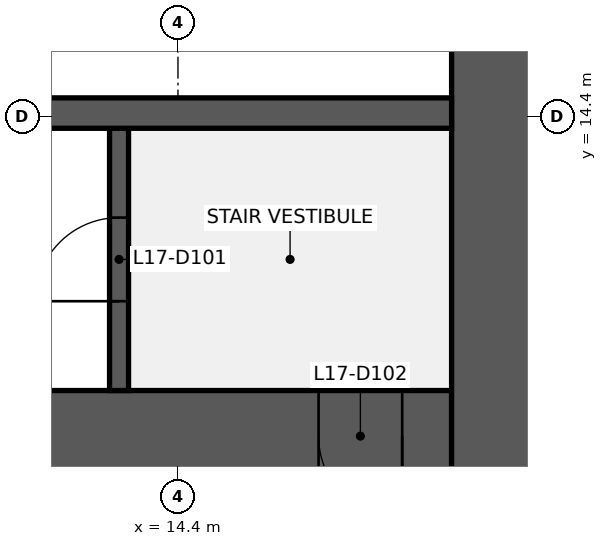
"""IFC4 building model, lengths in metres.
Left out: names, types, materials, properties, quantities, classifications, styles, units other than length and angle.
Written with IfcOpenShell. Run it as: python <this file> out.ifc"""

import sys

from ifc_helpers import new_model, si_unit, direction, frame, frame_2d, origin, place, context, subcontext, project, spatial, rectangle, extrude, element, fill, save


model = new_model("IFC4")
c1 = context("Model", 3, precision=1e-05, world=origin(), true_north=direction((0.0, 1.0)))
c2 = subcontext(c1, "Body", "Model", "MODEL_VIEW")
j1 = project(units=[si_unit("LENGTHUNIT", "METRE"), si_unit("PLANEANGLEUNIT", "RADIAN")], contexts=[c1])
p1 = place(None, origin())
s1 = spatial("IfcSite", under=j1, at=p1, CompositionType="ELEMENT")
p2 = place(p1, origin())
s2 = spatial("IfcBuilding", under=s1, at=p2, CompositionType="ELEMENT")
p3 = place(p2, frame((0.0, 0.0, 79.0)))
s3 = spatial("IfcBuildingStorey", under=s2, at=p3, CompositionType="ELEMENT", Elevation=79.0)
p4 = place(p3, frame((18.0, 10.2, 0.0), z_axis=(0.0, 0.0, 1.0), x_axis=(-1.0, 0.0, 0.0)))
e1 = element("IfcWall", 1, at=p4, inside=s3, PredefinedType="SHEAR", context=c2, shape_type="SweptSolid", body=[
    extrude(rectangle(XDim=13.2, YDim=1.2, at=frame_2d((6.6, 0.0))), origin(), (0.0, 0.0, 1.0), 3.84),
])
p5 = place(p4, frame((0.65, 0.0, 0.0)))
e2 = element("IfcOpeningElement", 2, at=p5, cuts=e1, PredefinedType="OPENING", context=c2, shape_type="SweptSolid", body=[
    extrude(rectangle(XDim=1.1, YDim=2.1, at=frame_2d((0.55, 1.05))), frame((0.0, 0.61, 0.0), z_axis=(0.0, -1.0, 0.0), x_axis=(1.0, 0.0, 0.0)), (0.0, 0.0, 1.0), 1.22),
])
p6 = place(p3, frame((18.6, 38.4, 0.0), z_axis=(0.0, 0.0, 1.0), x_axis=(0.0, -1.0, 0.0)))
e3 = element("IfcWall", 3, at=p6, inside=s3, PredefinedType="SHEAR", context=c2, shape_type="SweptSolid", body=[
    extrude(rectangle(XDim=28.8, YDim=1.2, at=frame_2d((14.4, 0.0))), origin(), (0.0, 0.0, 1.0), 3.84),
])
p7 = place(p6, frame((18.3, 0.0, 0.0)))
e4 = element("IfcOpeningElement", 4, at=p7, cuts=e3, PredefinedType="OPENING", context=c2, shape_type="SweptSolid", body=[
    extrude(rectangle(XDim=1.8, YDim=2.1, at=frame_2d((0.9, 1.05))), frame((0.0, 0.61, 0.0), z_axis=(0.0, -1.0, 0.0), x_axis=(1.0, 0.0, 0.0)), (0.0, 0.0, 1.0), 1.22),
])
p8 = place(p6, frame((8.7, 0.0, 0.0)))
e5 = element("IfcOpeningElement", 5, at=p8, cuts=e3, PredefinedType="OPENING", context=c2, shape_type="SweptSolid", body=[
    extrude(rectangle(XDim=1.8, YDim=2.1, at=frame_2d((0.9, 1.05))), frame((0.0, 0.61, 0.0), z_axis=(0.0, -1.0, 0.0), x_axis=(1.0, 0.0, 0.0)), (0.0, 0.0, 1.0), 1.22),
])
p9 = place(p3, frame((13.625, 10.8, 0.0), z_axis=(0.0, 0.0, 1.0), x_axis=(0.0, 1.0, 0.0)))
e6 = element("IfcWall", 6, at=p9, inside=s3, PredefinedType="SHEAR", context=c2, shape_type="SweptSolid", body=[
    extrude(rectangle(XDim=3.45, YDim=0.25, at=frame_2d((1.725, 0.0))), origin(), (0.0, 0.0, 1.0), 3.84),
])
p10 = place(p9, frame((1.175, 0.0, 0.0)))
e7 = element("IfcOpeningElement", 7, at=p10, cuts=e6, PredefinedType="OPENING", context=c2, shape_type="SweptSolid", body=[
    extrude(rectangle(XDim=1.1, YDim=2.1, at=frame_2d((0.55, 1.05))), frame((0.0, 0.135, 0.0), z_axis=(0.0, -1.0, 0.0), x_axis=(1.0, 0.0, 0.0)), (0.0, 0.0, 1.0), 0.27),
])
p11 = place(p3, frame((1.2, 14.45, 0.0), z_axis=(0.0, 0.0, 1.0), x_axis=(1.0, 0.0, 0.0)))
e8 = element("IfcWall", 8, at=p11, inside=s3, PredefinedType="SHEAR", context=c2, shape_type="SweptSolid", body=[
    extrude(rectangle(XDim=16.8, YDim=0.4, at=frame_2d((8.4, 0.0))), origin(), (0.0, 0.0, 1.0), 3.84),
])
p12 = place(p10, origin())
e9 = element("IfcDoor", 9, at=p12, inside=s3, OperationType="SINGLE_SWING_LEFT", PredefinedType="DOOR", context=c2, shape_type="SweptSolid", body=[
    extrude(rectangle(XDim=1.1, YDim=2.1, at=frame_2d((0.55, 1.05))), frame((0.0, 0.025, 0.0), z_axis=(0.0, -1.0, 0.0), x_axis=(1.0, 0.0, 0.0)), (0.0, 0.0, 1.0), 0.05),
])
fill(e7, e9)
p13 = place(p5, origin())
e10 = element("IfcDoor", 10, at=p13, inside=s3, OperationType="SINGLE_SWING_LEFT", PredefinedType="DOOR", context=c2, shape_type="SweptSolid", body=[
    extrude(rectangle(XDim=1.1, YDim=2.1, at=frame_2d((0.55, 1.05))), frame((0.0, 0.025, 0.0), z_axis=(0.0, -1.0, 0.0), x_axis=(1.0, 0.0, 0.0)), (0.0, 0.0, 1.0), 0.05),
])
fill(e2, e10)
save(model, sys.argv[1])
